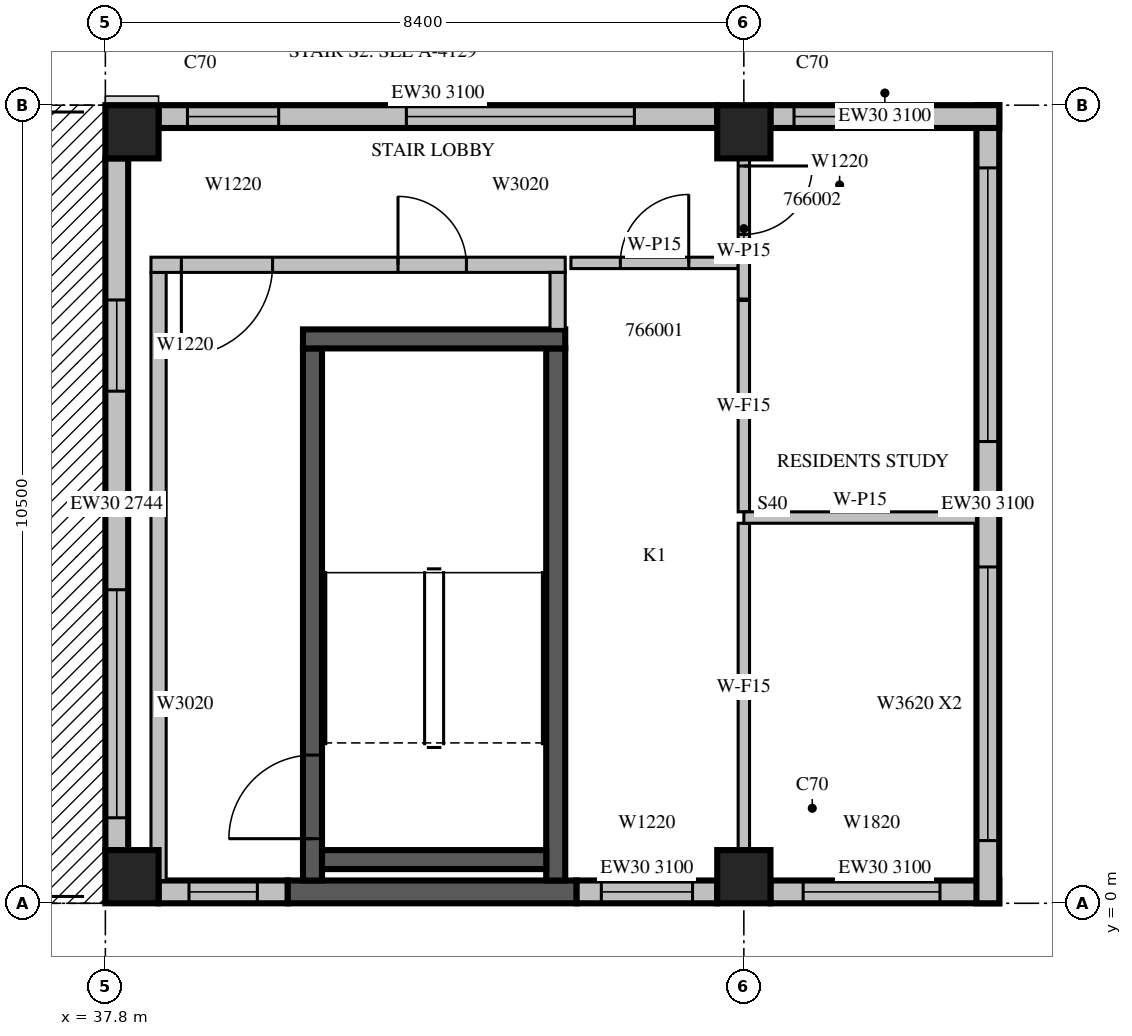
"""IFC4 building model, lengths in metres.
Left out: names, types, materials, properties, quantities, classifications, styles, units other than length and angle.
Written with IfcOpenShell. Run it as: python <this file> out.ifc"""

import sys

from ifc_helpers import new_model, si_unit, direction, frame, frame_2d, origin, origin_2d, place, context, subcontext, project, spatial, rectangle, extrude, source, transform, mapped, element, fill, save


model = new_model("IFC4")
c1 = context("Model", 3, precision=1e-05, world=origin(), true_north=direction((0.0, 1.0)))
c2 = subcontext(c1, "Body", "Model", "MODEL_VIEW")
j1 = project(units=[si_unit("LENGTHUNIT", "METRE"), si_unit("PLANEANGLEUNIT", "RADIAN")], contexts=[c1])
p1 = place(None, origin())
s1 = spatial("IfcSite", under=j1, at=p1, CompositionType="ELEMENT")
p2 = place(p1, origin())
s2 = spatial("IfcBuilding", under=s1, at=p2, CompositionType="ELEMENT")
p3 = place(p2, frame((0.0, 0.0, 291.5)))
s3 = spatial("IfcBuildingStorey", under=s2, at=p3, CompositionType="ELEMENT", Elevation=291.5)
m1 = source(origin(), c2, "Body", "SweptSolid", [
    extrude(rectangle(XDim=0.7, YDim=0.7, at=origin_2d()), origin(), (0.0, 0.0, 1.0), 3.5),
])
for number, where, z_axis, x_axis in (
    (1, (38.15, 0.35, 0.0), (0.0, 0.0, 1.0), (1.0, 0.0, 0.0)),
    (2, (46.2, 0.35, 0.0), (0.0, 0.0, 1.0), (1.0, 0.0, 0.0)),
    (3, (38.15, 10.15, 0.0), (0.0, 0.0, 1.0), (1.0, 0.0, 0.0)),
    (4, (46.2, 10.15, 0.0), (0.0, 0.0, 1.0), (1.0, 0.0, 0.0)),
):
    element("IfcColumn", number, at=place(p3, frame(where, z_axis=z_axis, x_axis=x_axis)), inside=s3, PredefinedType="COLUMN", context=c2, shape_type="MappedRepresentation", body=[
        mapped(m1, transform((0.0, 0.0, 0.0), scale=1.0)),
    ])
p4 = place(p3, frame((38.5, 0.15, 0.0), z_axis=(0.0, 0.0, 1.0), x_axis=(1.0, 0.0, 0.0)))
e5 = element("IfcWall", 5, at=p4, inside=s3, PredefinedType="STANDARD", context=c2, shape_type="SweptSolid", body=[
    extrude(rectangle(XDim=1.7, YDim=0.3, at=frame_2d((0.85, 0.0))), origin(), (0.0, 0.0, 1.0), 3.1),
])
p5 = place(p4, frame((0.4, 0.0, 0.6)))
e6 = element("IfcOpeningElement", 6, at=p5, cuts=e5, PredefinedType="OPENING", context=c2, shape_type="SweptSolid", body=[
    extrude(rectangle(XDim=0.9, YDim=2.0, at=frame_2d((0.45, 1.0))), frame((0.0, 0.16, 0.0), z_axis=(0.0, -1.0, 0.0), x_axis=(1.0, 0.0, 0.0)), (0.0, 0.0, 1.0), 0.32),
])
m2 = source(origin(), c2, "Body", "SweptSolid", [
    extrude(rectangle(XDim=3.8, YDim=0.3, at=frame_2d((1.9, 0.0))), origin(), (0.0, 0.0, 1.0), 3.1),
])
p6 = place(p3, frame((40.2, 0.15, 0.0), z_axis=(0.0, 0.0, 1.0), x_axis=(1.0, 0.0, 0.0)))
e7 = element("IfcWall", 7, at=p6, inside=s3, PredefinedType="SOLIDWALL", context=c2, shape_type="MappedRepresentation", body=[
    mapped(m2, transform((0.0, 0.0, 0.0), scale=1.0)),
])
m3 = source(origin(), c2, "Body", "SweptSolid", [
    extrude(rectangle(XDim=1.85, YDim=0.3, at=frame_2d((0.925, 0.0))), origin(), (0.0, 0.0, 1.0), 3.1),
])
p7 = place(p3, frame((44.0, 0.15, 0.0), z_axis=(0.0, 0.0, 1.0), x_axis=(1.0, 0.0, 0.0)))
e8 = element("IfcWall", 8, at=p7, inside=s3, PredefinedType="STANDARD", context=c2, shape_type="MappedRepresentation", body=[
    mapped(m3, transform((0.0, 0.0, 0.0), scale=1.0)),
])
m4 = source(origin(), c2, "Body", "SweptSolid", [
    extrude(rectangle(XDim=1.2, YDim=2.0, at=frame_2d((0.6, 1.0))), frame((0.0, 0.16, 0.0), z_axis=(0.0, -1.0, 0.0), x_axis=(1.0, 0.0, 0.0)), (0.0, 0.0, 1.0), 0.32),
])
p8 = place(p7, frame((0.325, 0.0, 0.6)))
e9 = element("IfcOpeningElement", 9, at=p8, cuts=e8, PredefinedType="OPENING", context=c2, shape_type="MappedRepresentation", body=[
    mapped(m4, transform((0.0, 0.0, 0.0), scale=1.0)),
])
m5 = source(origin(), c2, "Body", "SweptSolid", [
    extrude(rectangle(XDim=3.01, YDim=0.3, at=frame_2d((1.505, 0.0))), origin(), (0.0, 0.0, 1.0), 3.1),
])
p9 = place(p3, frame((46.55, 0.15, 0.0), z_axis=(0.0, 0.0, 1.0), x_axis=(1.0, 0.0, 0.0)))
e10 = element("IfcWall", 10, at=p9, inside=s3, PredefinedType="STANDARD", context=c2, shape_type="MappedRepresentation", body=[
    mapped(m5, transform((0.0, 0.0, 0.0), scale=1.0)),
])
m6 = source(origin(), c2, "Body", "SweptSolid", [
    extrude(rectangle(XDim=1.8, YDim=2.0, at=frame_2d((0.9, 1.0))), frame((0.0, 0.16, 0.0), z_axis=(0.0, -1.0, 0.0), x_axis=(1.0, 0.0, 0.0)), (0.0, 0.0, 1.0), 0.32),
])
p10 = place(p9, frame((0.43, 0.0, 0.6)))
e11 = element("IfcOpeningElement", 11, at=p10, cuts=e10, PredefinedType="OPENING", context=c2, shape_type="MappedRepresentation", body=[
    mapped(m6, transform((0.0, 0.0, 0.0), scale=1.0)),
])
m7 = source(origin(), c2, "Body", "SweptSolid", [
    extrude(rectangle(XDim=10.5, YDim=0.3, at=frame_2d((5.25, 0.0))), origin(), (0.0, 0.0, 1.0), 3.1),
])
p11 = place(p3, frame((49.41, 0.0, 0.0), z_axis=(0.0, 0.0, 1.0), x_axis=(0.0, 1.0, 0.0)))
e12 = element("IfcWall", 12, at=p11, inside=s3, PredefinedType="STANDARD", context=c2, shape_type="MappedRepresentation", body=[
    mapped(m7, transform((0.0, 0.0, 0.0), scale=1.0)),
])
m8 = source(origin(), c2, "Body", "SweptSolid", [
    extrude(rectangle(XDim=3.6, YDim=2.0, at=frame_2d((1.8, 1.0))), frame((0.0, 0.16, 0.0), z_axis=(0.0, -1.0, 0.0), x_axis=(1.0, 0.0, 0.0)), (0.0, 0.0, 1.0), 0.32),
])
p12 = place(p11, frame((0.825, 0.0, 0.6)))
e13 = element("IfcOpeningElement", 13, at=p12, cuts=e12, PredefinedType="OPENING", context=c2, shape_type="MappedRepresentation", body=[
    mapped(m8, transform((0.0, 0.0, 0.0), scale=1.0)),
])
p13 = place(p11, frame((6.075, 0.0, 0.6)))
e14 = element("IfcOpeningElement", 14, at=p13, cuts=e12, PredefinedType="OPENING", context=c2, shape_type="MappedRepresentation", body=[
    mapped(m8, transform((0.0, 0.0, 0.0), scale=1.0)),
])
p14 = place(p3, frame((49.56, 10.35, 0.0), z_axis=(0.0, 0.0, 1.0), x_axis=(-1.0, 0.0, 0.0)))
e15 = element("IfcWall", 15, at=p14, inside=s3, PredefinedType="STANDARD", context=c2, shape_type="MappedRepresentation", body=[
    mapped(m5, transform((0.0, 0.0, 0.0), scale=1.0)),
])
p15 = place(p14, frame((1.5, 0.0, 0.6)))
e16 = element("IfcOpeningElement", 16, at=p15, cuts=e15, PredefinedType="OPENING", context=c2, shape_type="MappedRepresentation", body=[
    mapped(m4, transform((0.0, 0.0, 0.0), scale=1.0)),
])
p16 = place(p3, frame((45.85, 10.35, 0.0), z_axis=(0.0, 0.0, 1.0), x_axis=(-1.0, 0.0, 0.0)))
e17 = element("IfcWall", 17, at=p16, inside=s3, PredefinedType="STANDARD", context=c2, shape_type="SweptSolid", body=[
    extrude(rectangle(XDim=7.35, YDim=0.3, at=frame_2d((3.675, 0.0))), origin(), (0.0, 0.0, 1.0), 3.1),
])
m9 = source(origin(), c2, "Body", "SweptSolid", [
    extrude(rectangle(XDim=3.0, YDim=2.0, at=frame_2d((1.5, 1.0))), frame((0.0, 0.16, 0.0), z_axis=(0.0, -1.0, 0.0), x_axis=(1.0, 0.0, 0.0)), (0.0, 0.0, 1.0), 0.32),
])
p17 = place(p16, frame((1.09, 0.0, 0.6)))
e18 = element("IfcOpeningElement", 18, at=p17, cuts=e17, PredefinedType="OPENING", context=c2, shape_type="MappedRepresentation", body=[
    mapped(m9, transform((0.0, 0.0, 0.0), scale=1.0)),
])
p18 = place(p16, frame((5.77, 0.0, 0.6)))
e19 = element("IfcOpeningElement", 19, at=p18, cuts=e17, PredefinedType="OPENING", context=c2, shape_type="MappedRepresentation", body=[
    mapped(m4, transform((0.0, 0.0, 0.0), scale=1.0)),
])
p19 = place(p3, frame((37.95, 9.8, 0.0), z_axis=(0.0, 0.0, 1.0), x_axis=(0.0, -1.0, 0.0)))
e20 = element("IfcWall", 20, at=p19, inside=s3, PredefinedType="STANDARD", context=c2, shape_type="SweptSolid", body=[
    extrude(rectangle(XDim=9.1, YDim=0.3, at=frame_2d((4.55, 0.0))), origin(), (0.0, 0.0, 1.0), 2.744),
])
p20 = place(p19, frame((1.863, 0.0, 0.6)))
e21 = element("IfcOpeningElement", 21, at=p20, cuts=e20, PredefinedType="OPENING", context=c2, shape_type="MappedRepresentation", body=[
    mapped(m4, transform((0.0, 0.0, 0.0), scale=1.0)),
])
p21 = place(p19, frame((5.675, 0.0, 0.6)))
e22 = element("IfcOpeningElement", 22, at=p21, cuts=e20, PredefinedType="OPENING", context=c2, shape_type="MappedRepresentation", body=[
    mapped(m9, transform((0.0, 0.0, 0.0), scale=1.0)),
])
m10 = source(origin(), c2, "Body", "SweptSolid", [
    extrude(rectangle(XDim=7.0, YDim=0.25, at=frame_2d((3.5, 0.0))), origin(), (0.0, 0.0, 1.0), 3.1),
])
p22 = place(p3, frame((40.525, 0.3, 0.0), z_axis=(0.0, 0.0, 1.0), x_axis=(0.0, 1.0, 0.0)))
e23 = element("IfcWall", 23, at=p22, inside=s3, PredefinedType="SOLIDWALL", context=c2, shape_type="MappedRepresentation", body=[
    mapped(m10, transform((0.0, 0.0, 0.0), scale=1.0)),
])
m11 = source(origin(), c2, "Body", "SweptSolid", [
    extrude(rectangle(XDim=1.1, YDim=2.1, at=frame_2d((0.55, 1.05))), frame((0.0, 0.135, 0.0), z_axis=(0.0, -1.0, 0.0), x_axis=(1.0, 0.0, 0.0)), (0.0, 0.0, 1.0), 0.27),
])
p23 = place(p22, frame((0.55, 0.0, 0.0)))
e24 = element("IfcOpeningElement", 24, at=p23, cuts=e23, PredefinedType="OPENING", context=c2, shape_type="MappedRepresentation", body=[
    mapped(m11, transform((0.0, 0.0, 0.0), scale=1.0)),
])
p24 = place(p3, frame((43.725, 0.3, 0.0), z_axis=(0.0, 0.0, 1.0), x_axis=(0.0, 1.0, 0.0)))
e25 = element("IfcWall", 25, at=p24, inside=s3, PredefinedType="SOLIDWALL", context=c2, shape_type="MappedRepresentation", body=[
    mapped(m10, transform((0.0, 0.0, 0.0), scale=1.0)),
])
m12 = source(origin(), c2, "Body", "SweptSolid", [
    extrude(rectangle(XDim=3.45, YDim=0.25, at=frame_2d((1.725, 0.0))), origin(), (0.0, 0.0, 1.0), 3.1),
])
p25 = place(p3, frame((40.4, 7.425, 0.0), z_axis=(0.0, 0.0, 1.0), x_axis=(1.0, 0.0, 0.0)))
e26 = element("IfcWall", 26, at=p25, inside=s3, PredefinedType="SOLIDWALL", context=c2, shape_type="MappedRepresentation", body=[
    mapped(m12, transform((0.0, 0.0, 0.0), scale=1.0)),
])
m13 = source(origin(), c2, "Body", "SweptSolid", [
    extrude(rectangle(XDim=2.95, YDim=0.25, at=frame_2d((1.475, 0.0))), origin(), (0.0, 0.0, 1.0), 3.1),
])
p26 = place(p3, frame((40.65, 0.575, 0.0), z_axis=(0.0, 0.0, 1.0), x_axis=(1.0, 0.0, 0.0)))
e27 = element("IfcWall", 27, at=p26, inside=s3, PredefinedType="SOLIDWALL", context=c2, shape_type="MappedRepresentation", body=[
    mapped(m13, transform((0.0, 0.0, 0.0), scale=1.0)),
])
m14 = source(origin(), c2, "Body", "SweptSolid", [
    extrude(rectangle(XDim=8.0, YDim=0.2, at=frame_2d((4.0, 0.0))), origin(), (0.0, 0.0, 1.0), 3.1),
])
p27 = place(p3, frame((38.5, 0.3, 0.0), z_axis=(0.0, 0.0, 1.0), x_axis=(0.0, 1.0, 0.0)))
e28 = element("IfcWall", 28, at=p27, inside=s3, PredefinedType="PARTITIONING", context=c2, shape_type="MappedRepresentation", body=[
    mapped(m14, transform((0.0, 0.0, 0.0), scale=1.0)),
])
m15 = source(origin(), c2, "Body", "SweptSolid", [
    extrude(rectangle(XDim=5.45, YDim=0.2, at=frame_2d((2.725, 0.0))), origin(), (0.0, 0.0, 1.0), 3.1),
])
p28 = place(p3, frame((38.4, 8.4, 0.0), z_axis=(0.0, 0.0, 1.0), x_axis=(1.0, 0.0, 0.0)))
e29 = element("IfcWall", 29, at=p28, inside=s3, PredefinedType="PARTITIONING", context=c2, shape_type="MappedRepresentation", body=[
    mapped(m15, transform((0.0, 0.0, 0.0), scale=1.0)),
])
m16 = source(origin(), c2, "Body", "SweptSolid", [
    extrude(rectangle(XDim=1.2, YDim=2.1, at=frame_2d((0.6, 1.05))), frame((0.0, 0.11, 0.0), z_axis=(0.0, -1.0, 0.0), x_axis=(1.0, 0.0, 0.0)), (0.0, 0.0, 1.0), 0.22),
])
p29 = place(p28, frame((0.4, 0.0, 0.0)))
e30 = element("IfcOpeningElement", 30, at=p29, cuts=e29, PredefinedType="OPENING", context=c2, shape_type="MappedRepresentation", body=[
    mapped(m16, transform((0.0, 0.0, 0.0), scale=1.0)),
])
m17 = source(origin(), c2, "Body", "SweptSolid", [
    extrude(rectangle(XDim=0.9, YDim=2.1, at=frame_2d((0.45, 1.05))), frame((0.0, 0.11, 0.0), z_axis=(0.0, -1.0, 0.0), x_axis=(1.0, 0.0, 0.0)), (0.0, 0.0, 1.0), 0.22),
])
p30 = place(p28, frame((3.25, 0.0, 0.0)))
e31 = element("IfcOpeningElement", 31, at=p30, cuts=e29, PredefinedType="OPENING", context=c2, shape_type="MappedRepresentation", body=[
    mapped(m17, transform((0.0, 0.0, 0.0), scale=1.0)),
])
m18 = source(origin(), c2, "Body", "SweptSolid", [
    extrude(rectangle(XDim=0.75, YDim=0.2, at=frame_2d((0.375, 0.0))), origin(), (0.0, 0.0, 1.0), 3.1),
])
p31 = place(p3, frame((43.75, 7.55, 0.0), z_axis=(0.0, 0.0, 1.0), x_axis=(0.0, 1.0, 0.0)))
e32 = element("IfcWall", 32, at=p31, inside=s3, PredefinedType="PARTITIONING", context=c2, shape_type="MappedRepresentation", body=[
    mapped(m18, transform((0.0, 0.0, 0.0), scale=1.0)),
])
m19 = source(origin(), c2, "Body", "SweptSolid", [
    extrude(rectangle(XDim=2.2, YDim=0.15, at=frame_2d((1.1, 0.0))), origin(), (0.0, 0.0, 1.0), 3.1),
])
p32 = place(p3, frame((46.125, 8.425, 0.0), z_axis=(0.0, 0.0, 1.0), x_axis=(-1.0, 0.0, 0.0)))
e33 = element("IfcWall", 33, at=p32, inside=s3, PredefinedType="PARTITIONING", context=c2, shape_type="MappedRepresentation", body=[
    mapped(m19, transform((0.0, 0.0, 0.0), scale=1.0)),
])
m20 = source(origin(), c2, "Body", "SweptSolid", [
    extrude(rectangle(XDim=0.9, YDim=2.1, at=frame_2d((0.45, 1.05))), frame((0.0, 0.085, 0.0), z_axis=(0.0, -1.0, 0.0), x_axis=(1.0, 0.0, 0.0)), (0.0, 0.0, 1.0), 0.17),
])
p33 = place(p32, frame((0.65, 0.0, 0.0)))
e34 = element("IfcOpeningElement", 34, at=p33, cuts=e33, PredefinedType="OPENING", context=c2, shape_type="MappedRepresentation", body=[
    mapped(m20, transform((0.0, 0.0, 0.0), scale=1.0)),
])
p34 = place(p3, frame((46.2, 9.801, 0.0), z_axis=(0.0, 0.0, 1.0), x_axis=(0.0, -1.0, 0.0)))
e35 = element("IfcWall", 35, at=p34, inside=s3, PredefinedType="PARTITIONING", context=c2, shape_type="SweptSolid", body=[
    extrude(rectangle(XDim=1.851, YDim=0.15, at=frame_2d((0.925, 0.0))), origin(), (0.0, 0.0, 1.0), 3.1),
])
p35 = place(p34, frame((0.101, 0.0, 0.0)))
e36 = element("IfcOpeningElement", 36, at=p35, cuts=e35, PredefinedType="OPENING", context=c2, shape_type="MappedRepresentation", body=[
    mapped(m20, transform((0.0, 0.0, 0.0), scale=1.0)),
])
p36 = place(p3, frame((46.2, 0.699, 0.0), z_axis=(0.0, 0.0, 1.0), x_axis=(0.0, 1.0, 0.0)))
e37 = element("IfcWall", 37, at=p36, inside=s3, PredefinedType="PARTITIONING", context=c2, shape_type="SweptSolid", body=[
    extrude(rectangle(XDim=4.301, YDim=0.15, at=frame_2d((2.151, 0.0))), origin(), (0.0, 0.0, 1.0), 3.1),
])
p37 = place(p3, frame((46.2, 5.15, 0.0), z_axis=(0.0, 0.0, 1.0), x_axis=(0.0, 1.0, 0.0)))
e38 = element("IfcWall", 38, at=p37, inside=s3, PredefinedType="PARTITIONING", context=c2, shape_type="SweptSolid", body=[
    extrude(rectangle(XDim=2.78, YDim=0.15, at=frame_2d((1.39, 0.0))), origin(), (0.0, 0.0, 1.0), 3.1),
])
m21 = source(origin(), c2, "Body", "SweptSolid", [
    extrude(rectangle(XDim=3.06, YDim=0.15, at=frame_2d((1.53, 0.0))), origin(), (0.0, 0.0, 1.0), 3.1),
])
p38 = place(p3, frame((49.26, 5.075, 0.0), z_axis=(0.0, 0.0, 1.0), x_axis=(-1.0, 0.0, 0.0)))
e39 = element("IfcWall", 39, at=p38, inside=s3, PredefinedType="PARTITIONING", context=c2, shape_type="MappedRepresentation", body=[
    mapped(m21, transform((0.0, 0.0, 0.0), scale=1.0)),
])
p39 = place(p5, origin())
e40 = element("IfcWindow", 40, at=p39, inside=s3, PartitioningType="SINGLE_PANEL", PredefinedType="WINDOW", context=c2, shape_type="SweptSolid", body=[
    extrude(rectangle(XDim=0.9, YDim=2.0, at=frame_2d((0.45, 1.0))), frame((0.0, 0.03, 0.0), z_axis=(0.0, -1.0, 0.0), x_axis=(1.0, 0.0, 0.0)), (0.0, 0.0, 1.0), 0.06),
])
fill(e6, e40)
m22 = source(origin(), c2, "Body", "SweptSolid", [
    extrude(rectangle(XDim=1.2, YDim=2.0, at=frame_2d((0.6, 1.0))), frame((0.0, 0.03, 0.0), z_axis=(0.0, -1.0, 0.0), x_axis=(1.0, 0.0, 0.0)), (0.0, 0.0, 1.0), 0.06),
])
p40 = place(p8, origin())
e41 = element("IfcWindow", 41, at=p40, inside=s3, PartitioningType="SINGLE_PANEL", PredefinedType="WINDOW", context=c2, shape_type="MappedRepresentation", body=[
    mapped(m22, transform((0.0, 0.0, 0.0), scale=1.0)),
])
fill(e9, e41)
m23 = source(origin(), c2, "Body", "SweptSolid", [
    extrude(rectangle(XDim=1.8, YDim=2.0, at=frame_2d((0.9, 1.0))), frame((0.0, 0.03, 0.0), z_axis=(0.0, -1.0, 0.0), x_axis=(1.0, 0.0, 0.0)), (0.0, 0.0, 1.0), 0.06),
])
p41 = place(p10, origin())
e42 = element("IfcWindow", 42, at=p41, inside=s3, PartitioningType="SINGLE_PANEL", PredefinedType="WINDOW", context=c2, shape_type="MappedRepresentation", body=[
    mapped(m23, transform((0.0, 0.0, 0.0), scale=1.0)),
])
fill(e11, e42)
m24 = source(origin(), c2, "Body", "SweptSolid", [
    extrude(rectangle(XDim=3.6, YDim=2.0, at=frame_2d((1.8, 1.0))), frame((0.0, 0.03, 0.0), z_axis=(0.0, -1.0, 0.0), x_axis=(1.0, 0.0, 0.0)), (0.0, 0.0, 1.0), 0.06),
])
p42 = place(p12, origin())
e43 = element("IfcWindow", 43, at=p42, inside=s3, PartitioningType="SINGLE_PANEL", PredefinedType="WINDOW", context=c2, shape_type="MappedRepresentation", body=[
    mapped(m24, transform((0.0, 0.0, 0.0), scale=1.0)),
])
fill(e13, e43)
p43 = place(p13, origin())
e44 = element("IfcWindow", 44, at=p43, inside=s3, PartitioningType="SINGLE_PANEL", PredefinedType="WINDOW", context=c2, shape_type="MappedRepresentation", body=[
    mapped(m24, transform((0.0, 0.0, 0.0), scale=1.0)),
])
fill(e14, e44)
p44 = place(p15, origin())
e45 = element("IfcWindow", 45, at=p44, inside=s3, PartitioningType="SINGLE_PANEL", PredefinedType="WINDOW", context=c2, shape_type="MappedRepresentation", body=[
    mapped(m22, transform((0.0, 0.0, 0.0), scale=1.0)),
])
fill(e16, e45)
m25 = source(origin(), c2, "Body", "SweptSolid", [
    extrude(rectangle(XDim=3.0, YDim=2.0, at=frame_2d((1.5, 1.0))), frame((0.0, 0.03, 0.0), z_axis=(0.0, -1.0, 0.0), x_axis=(1.0, 0.0, 0.0)), (0.0, 0.0, 1.0), 0.06),
])
p45 = place(p17, origin())
e46 = element("IfcWindow", 46, at=p45, inside=s3, PartitioningType="SINGLE_PANEL", PredefinedType="WINDOW", context=c2, shape_type="MappedRepresentation", body=[
    mapped(m25, transform((0.0, 0.0, 0.0), scale=1.0)),
])
fill(e18, e46)
p46 = place(p18, origin())
e47 = element("IfcWindow", 47, at=p46, inside=s3, PartitioningType="SINGLE_PANEL", PredefinedType="WINDOW", context=c2, shape_type="MappedRepresentation", body=[
    mapped(m22, transform((0.0, 0.0, 0.0), scale=1.0)),
])
fill(e19, e47)
p47 = place(p20, origin())
e48 = element("IfcWindow", 48, at=p47, inside=s3, PartitioningType="SINGLE_PANEL", PredefinedType="WINDOW", context=c2, shape_type="MappedRepresentation", body=[
    mapped(m22, transform((0.0, 0.0, 0.0), scale=1.0)),
])
fill(e21, e48)
p48 = place(p21, origin())
e49 = element("IfcWindow", 49, at=p48, inside=s3, PartitioningType="SINGLE_PANEL", PredefinedType="WINDOW", context=c2, shape_type="MappedRepresentation", body=[
    mapped(m25, transform((0.0, 0.0, 0.0), scale=1.0)),
])
fill(e22, e49)
m26 = source(origin(), c2, "Body", "SweptSolid", [
    extrude(rectangle(XDim=1.1, YDim=2.1, at=frame_2d((0.55, 1.05))), frame((0.0, 0.025, 0.0), z_axis=(0.0, -1.0, 0.0), x_axis=(1.0, 0.0, 0.0)), (0.0, 0.0, 1.0), 0.05),
])
p49 = place(p23, origin())
e50 = element("IfcDoor", 50, at=p49, inside=s3, OperationType="SINGLE_SWING_LEFT", PredefinedType="DOOR", context=c2, shape_type="MappedRepresentation", body=[
    mapped(m26, transform((0.0, 0.0, 0.0), scale=1.0)),
])
fill(e24, e50)
m27 = source(origin(), c2, "Body", "SweptSolid", [
    extrude(rectangle(XDim=1.2, YDim=2.1, at=frame_2d((0.6, 1.05))), frame((0.0, 0.025, 0.0), z_axis=(0.0, -1.0, 0.0), x_axis=(1.0, 0.0, 0.0)), (0.0, 0.0, 1.0), 0.05),
])
p50 = place(p29, origin())
e51 = element("IfcDoor", 51, at=p50, inside=s3, OperationType="SINGLE_SWING_RIGHT", PredefinedType="DOOR", context=c2, shape_type="MappedRepresentation", body=[
    mapped(m27, transform((0.0, 0.0, 0.0), scale=1.0)),
])
fill(e30, e51)
m28 = source(origin(), c2, "Body", "SweptSolid", [
    extrude(rectangle(XDim=0.9, YDim=2.1, at=frame_2d((0.45, 1.05))), frame((0.0, 0.025, 0.0), z_axis=(0.0, -1.0, 0.0), x_axis=(1.0, 0.0, 0.0)), (0.0, 0.0, 1.0), 0.05),
])
p51 = place(p30, origin())
e52 = element("IfcDoor", 52, at=p51, inside=s3, OperationType="SINGLE_SWING_LEFT", PredefinedType="DOOR", context=c2, shape_type="MappedRepresentation", body=[
    mapped(m28, transform((0.0, 0.0, 0.0), scale=1.0)),
])
fill(e31, e52)
p52 = place(p33, origin())
e53 = element("IfcDoor", 53, at=p52, inside=s3, OperationType="SINGLE_SWING_RIGHT", PredefinedType="DOOR", context=c2, shape_type="MappedRepresentation", body=[
    mapped(m28, transform((0.0, 0.0, 0.0), scale=1.0)),
])
fill(e34, e53)
p53 = place(p35, origin())
e54 = element("IfcDoor", 54, at=p53, inside=s3, OperationType="SINGLE_SWING_LEFT", PredefinedType="DOOR", context=c2, shape_type="MappedRepresentation", body=[
    mapped(m28, transform((0.0, 0.0, 0.0), scale=1.0)),
])
fill(e36, e54)
save(model, sys.argv[1])
